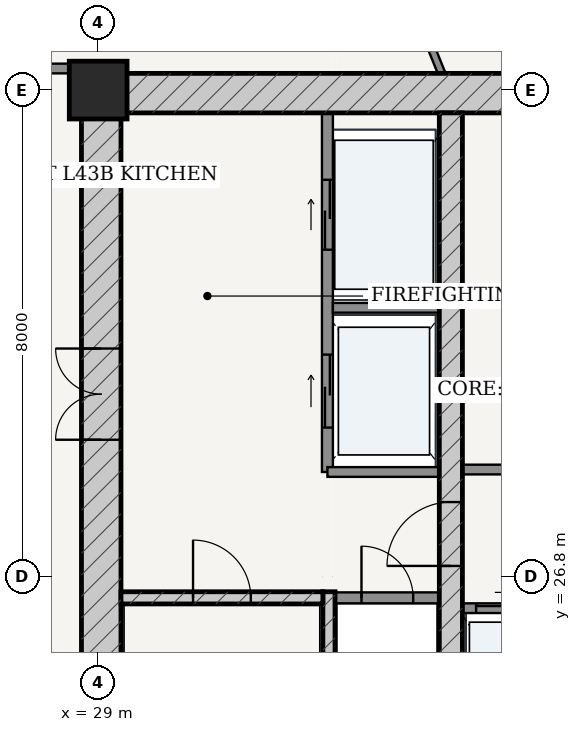
"""IFC4 building model, lengths in metres.
Left out: names, types, materials, properties, quantities, classifications, styles, units other than length and angle.
Written with IfcOpenShell. Run it as: python <this file> out.ifc"""

import sys

from ifc_helpers import new_model, si_unit, direction, frame, frame_2d, origin, origin_2d, place, context, subcontext, project, spatial, rectangle, extrude, source, transform, mapped, element, fill, save


model = new_model("IFC4")
c1 = context("Model", 3, precision=1e-05, world=origin(), true_north=direction((-0.2419218956, 0.970295726276)))
c2 = subcontext(c1, "Body", "Model", "MODEL_VIEW")
j1 = project(units=[si_unit("LENGTHUNIT", "METRE"), si_unit("PLANEANGLEUNIT", "RADIAN")], contexts=[c1])
p1 = place(None, origin())
s1 = spatial("IfcSite", under=j1, at=p1, CompositionType="ELEMENT")
p2 = place(p1, origin())
s2 = spatial("IfcBuilding", under=s1, at=p2, CompositionType="ELEMENT")
p3 = place(p2, frame((0.0, 0.0, 164.2)))
s3 = spatial("IfcBuildingStorey", under=s2, at=p3, CompositionType="ELEMENT", Elevation=164.2)
p4 = place(p3, frame((29.0, 34.8, 0.0), z_axis=(0.0, 0.0, 1.0), x_axis=(1.0, 0.0, 0.0)))
e1 = element("IfcColumn", 1, at=p4, inside=s3, PredefinedType="COLUMN", context=c2, shape_type="SweptSolid", body=[
    extrude(rectangle(XDim=0.95, YDim=0.95, at=origin_2d()), origin(), (0.0, 0.0, 1.0), 3.6),
])
p5 = place(p3, frame((28.725, 34.75, 0.0), z_axis=(0.0, 0.0, 1.0), x_axis=(1.0, 0.0, 0.0)))
e2 = element("IfcWall", 2, at=p5, inside=s3, PredefinedType="SHEAR", context=c2, shape_type="SweptSolid", body=[
    extrude(rectangle(XDim=18.55, YDim=0.65, at=frame_2d((9.275, 0.0))), origin(), (0.0, 0.0, 1.0), 3.33),
])
p6 = place(p3, frame((29.05, 19.175, 0.0), z_axis=(0.0, 0.0, 1.0), x_axis=(0.0, 1.0, 0.0)))
e3 = element("IfcWall", 3, at=p6, inside=s3, PredefinedType="SHEAR", context=c2, shape_type="SweptSolid", body=[
    extrude(rectangle(XDim=15.25, YDim=0.65, at=frame_2d((7.625, 0.0))), origin(), (0.0, 0.0, 1.0), 3.33),
])
p7 = place(p6, frame((9.875, 0.0, 0.0)))
e4 = element("IfcOpeningElement", 4, at=p7, cuts=e3, PredefinedType="OPENING", context=c2, shape_type="SweptSolid", body=[
    extrude(rectangle(XDim=1.5, YDim=2.2, at=frame_2d((0.75, 1.1))), frame((0.0, 0.335, 0.0), z_axis=(0.0, -1.0, 0.0), x_axis=(1.0, 0.0, 0.0)), (0.0, 0.0, 1.0), 0.67),
])
p8 = place(p3, frame((32.795, 19.175, 0.0), z_axis=(0.0, 0.0, 1.0), x_axis=(0.0, 1.0, 0.0)))
e5 = element("IfcWall", 5, at=p8, inside=s3, PredefinedType="SOLIDWALL", context=c2, shape_type="SweptSolid", body=[
    extrude(rectangle(XDim=7.375, YDim=0.2, at=frame_2d((3.688, 0.0))), origin(), (0.0, 0.0, 1.0), 3.33),
])
p9 = place(p3, frame((29.375, 26.45, 0.0), z_axis=(0.0, 0.0, 1.0), x_axis=(1.0, 0.0, 0.0)))
e6 = element("IfcWall", 6, at=p9, inside=s3, PredefinedType="SOLIDWALL", context=c2, shape_type="SweptSolid", body=[
    extrude(rectangle(XDim=3.32, YDim=0.2, at=frame_2d((1.66, 0.0))), origin(), (0.0, 0.0, 1.0), 3.33),
])
p10 = place(p9, frame((1.185, 0.0, 0.0)))
e7 = element("IfcOpeningElement", 7, at=p10, cuts=e6, PredefinedType="OPENING", context=c2, shape_type="SweptSolid", body=[
    extrude(rectangle(XDim=0.95, YDim=2.15, at=frame_2d((0.475, 1.075))), frame((0.0, 0.11, 0.0), z_axis=(0.0, -1.0, 0.0), x_axis=(1.0, 0.0, 0.0)), (0.0, 0.0, 1.0), 0.22),
])
p11 = place(p3, frame((34.8, 19.175, 0.0), z_axis=(0.0, 0.0, 1.0), x_axis=(0.0, 1.0, 0.0)))
e8 = element("IfcWall", 8, at=p11, inside=s3, PredefinedType="SHEAR", context=c2, shape_type="SweptSolid", body=[
    extrude(rectangle(XDim=15.25, YDim=0.38, at=frame_2d((7.625, 0.0))), origin(), (0.0, 0.0, 1.0), 3.33),
])
p12 = place(p11, frame((7.8, 0.0, 0.0)))
e9 = element("IfcOpeningElement", 9, at=p12, cuts=e8, PredefinedType="OPENING", context=c2, shape_type="SweptSolid", body=[
    extrude(rectangle(XDim=1.05, YDim=2.15, at=frame_2d((0.525, 1.075))), frame((0.0, 0.2, 0.0), z_axis=(0.0, -1.0, 0.0), x_axis=(1.0, 0.0, 0.0)), (0.0, 0.0, 1.0), 0.4),
])
p13 = place(p3, frame((32.9, 26.45, 0.0), z_axis=(0.0, 0.0, 1.0), x_axis=(1.0, 0.0, 0.0)))
e10 = element("IfcWall", 10, at=p13, inside=s3, PredefinedType="PARTITIONING", context=c2, shape_type="SweptSolid", body=[
    extrude(rectangle(XDim=1.71, YDim=0.18, at=frame_2d((0.855, 0.0))), origin(), (0.0, 0.0, 1.0), 3.33),
])
p14 = place(p13, frame((0.43, 0.0, 0.0)))
e11 = element("IfcOpeningElement", 11, at=p14, cuts=e10, PredefinedType="OPENING", context=c2, shape_type="SweptSolid", body=[
    extrude(rectangle(XDim=0.85, YDim=2.1, at=frame_2d((0.425, 1.05))), frame((0.0, 0.1, 0.0), z_axis=(0.0, -1.0, 0.0), x_axis=(1.0, 0.0, 0.0)), (0.0, 0.0, 1.0), 0.2),
])
p15 = place(p3, frame((32.77, 28.52, 0.0), z_axis=(0.0, 0.0, 1.0), x_axis=(0.0, 1.0, 0.0)))
e12 = element("IfcWall", 12, at=p15, inside=s3, PredefinedType="PARTITIONING", context=c2, shape_type="SweptSolid", body=[
    extrude(rectangle(XDim=5.905, YDim=0.18, at=frame_2d((2.953, 0.0))), origin(), (0.0, 0.0, 1.0), 3.33),
])
p16 = place(p15, frame((3.655, 0.0, 0.0)))
e13 = element("IfcOpeningElement", 13, at=p16, cuts=e12, PredefinedType="OPENING", context=c2, shape_type="SweptSolid", body=[
    extrude(rectangle(XDim=1.15, YDim=2.2, at=frame_2d((0.575, 1.1))), frame((0.0, 0.1, 0.0), z_axis=(0.0, -1.0, 0.0), x_axis=(1.0, 0.0, 0.0)), (0.0, 0.0, 1.0), 0.2),
])
p17 = place(p15, frame((0.73, 0.0, 0.0)))
e14 = element("IfcOpeningElement", 14, at=p17, cuts=e12, PredefinedType="OPENING", context=c2, shape_type="SweptSolid", body=[
    extrude(rectangle(XDim=1.2, YDim=2.25, at=frame_2d((0.6, 1.125))), frame((0.0, 0.1, 0.0), z_axis=(0.0, -1.0, 0.0), x_axis=(1.0, 0.0, 0.0)), (0.0, 0.0, 1.0), 0.2),
])
p18 = place(p3, frame((32.86, 31.22, 0.0), z_axis=(0.0, 0.0, 1.0), x_axis=(1.0, 0.0, 0.0)))
e15 = element("IfcWall", 15, at=p18, inside=s3, PredefinedType="PARTITIONING", context=c2, shape_type="SweptSolid", body=[
    extrude(rectangle(XDim=1.75, YDim=0.16, at=frame_2d((0.875, 0.0))), origin(), (0.0, 0.0, 1.0), 3.33),
])
p19 = place(p3, frame((32.77, 28.52, 0.0), z_axis=(0.0, 0.0, 1.0), x_axis=(1.0, 0.0, 0.0)))
e16 = element("IfcWall", 16, at=p19, inside=s3, PredefinedType="PARTITIONING", context=c2, shape_type="SweptSolid", body=[
    extrude(rectangle(XDim=1.84, YDim=0.16, at=frame_2d((0.92, 0.0))), origin(), (0.0, 0.0, 1.0), 3.33),
])
p20 = place(p3, frame((34.99, 28.56, 0.0), z_axis=(0.0, 0.0, 1.0), x_axis=(1.0, 0.0, 0.0)))
e17 = element("IfcWall", 17, at=p20, inside=s3, PredefinedType="PARTITIONING", context=c2, shape_type="SweptSolid", body=[
    extrude(rectangle(XDim=6.02, YDim=0.16, at=frame_2d((3.01, 0.0))), origin(), (0.0, 0.0, 1.0), 3.33),
])
p21 = place(p20, frame((2.585, 0.0, 0.0)))
e18 = element("IfcOpeningElement", 18, at=p21, cuts=e17, PredefinedType="OPENING", context=c2, shape_type="SweptSolid", body=[
    extrude(rectangle(XDim=0.85, YDim=2.1, at=frame_2d((0.425, 1.05))), frame((0.0, 0.09, 0.0), z_axis=(0.0, -1.0, 0.0), x_axis=(1.0, 0.0, 0.0)), (0.0, 0.0, 1.0), 0.18),
])
p22 = place(p3, frame((34.99, 26.28, 0.0), z_axis=(0.0, 0.0, 1.0), x_axis=(1.0, 0.0, 0.0)))
e19 = element("IfcWall", 19, at=p22, inside=s3, PredefinedType="PARTITIONING", context=c2, shape_type="SweptSolid", body=[
    extrude(rectangle(XDim=6.02, YDim=0.16, at=frame_2d((3.01, 0.0))), origin(), (0.0, 0.0, 1.0), 3.33),
])
p23 = place(p22, frame((0.225, 0.0, 0.0)))
e20 = element("IfcOpeningElement", 20, at=p23, cuts=e19, PredefinedType="OPENING", context=c2, shape_type="SweptSolid", body=[
    extrude(rectangle(XDim=1.1, YDim=2.2, at=frame_2d((0.55, 1.1))), frame((0.0, 0.09, 0.0), z_axis=(0.0, -1.0, 0.0), x_axis=(1.0, 0.0, 0.0)), (0.0, 0.0, 1.0), 0.18),
])
p24 = place(p22, frame((1.705, 0.0, 0.0)))
e21 = element("IfcOpeningElement", 21, at=p24, cuts=e19, PredefinedType="OPENING", context=c2, shape_type="SweptSolid", body=[
    extrude(rectangle(XDim=1.1, YDim=2.2, at=frame_2d((0.55, 1.1))), frame((0.0, 0.09, 0.0), z_axis=(0.0, -1.0, 0.0), x_axis=(1.0, 0.0, 0.0)), (0.0, 0.0, 1.0), 0.18),
])
p25 = place(p3, frame((26.795, 35.155, 0.0), z_axis=(0.0, 0.0, 1.0), x_axis=(1.0, 0.0, 0.0)))
e22 = element("IfcWall", 22, at=p25, inside=s3, PredefinedType="PARTITIONING", context=c2, shape_type="SweptSolid", body=[
    extrude(rectangle(XDim=1.93, YDim=0.16, at=frame_2d((0.965, 0.0))), origin(), (0.0, 0.0, 1.0), 2.776),
])
p26 = place(p3, frame((34.649, 35.075, 0.0), z_axis=(0.0, 0.0, 1.0), x_axis=(-0.37535719187, 0.926880239573, 0.0)))
e23 = element("IfcWall", 23, at=p26, inside=s3, PredefinedType="PARTITIONING", context=c2, shape_type="SweptSolid", body=[
    extrude(rectangle(XDim=2.916, YDim=0.12, at=frame_2d((1.458, 0.0))), origin(), (0.0, 0.0, 1.0), 3.33),
])
p27 = place(p26, frame((1.028, 0.0, 0.0)))
e24 = element("IfcOpeningElement", 24, at=p27, cuts=e23, PredefinedType="OPENING", context=c2, shape_type="SweptSolid", body=[
    extrude(rectangle(XDim=0.86, YDim=2.15, at=frame_2d((0.43, 1.075))), frame((0.0, 0.07, 0.0), z_axis=(0.0, -1.0, 0.0), x_axis=(1.0, 0.0, 0.0)), (0.0, 0.0, 1.0), 0.14),
])
m1 = source(origin(), c2, "Body", "SweptSolid", [
    extrude(rectangle(XDim=1.5, YDim=2.2, at=frame_2d((0.75, 1.1))), frame((0.0, 0.025, 0.0), z_axis=(0.0, -1.0, 0.0), x_axis=(1.0, 0.0, 0.0)), (0.0, 0.0, 1.0), 0.05),
])
p28 = place(p7, origin())
e25 = element("IfcDoor", 25, at=p28, inside=s3, OperationType="DOUBLE_DOOR_SINGLE_SWING", PredefinedType="DOOR", context=c2, shape_type="MappedRepresentation", body=[
    mapped(m1, transform((0.0, 0.0, 0.0), scale=1.0)),
])
fill(e4, e25)
m2 = source(origin(), c2, "Body", "SweptSolid", [
    extrude(rectangle(XDim=1.05, YDim=2.15, at=frame_2d((0.525, 1.075))), frame((0.0, 0.025, 0.0), z_axis=(0.0, -1.0, 0.0), x_axis=(1.0, 0.0, 0.0)), (0.0, 0.0, 1.0), 0.05),
])
p29 = place(p12, origin())
e26 = element("IfcDoor", 26, at=p29, inside=s3, OperationType="SINGLE_SWING_LEFT", PredefinedType="DOOR", context=c2, shape_type="MappedRepresentation", body=[
    mapped(m2, transform((0.0, 0.0, 0.0), scale=1.0)),
])
fill(e9, e26)
m3 = source(origin(), c2, "Body", "SweptSolid", [
    extrude(rectangle(XDim=0.95, YDim=2.15, at=frame_2d((0.475, 1.075))), frame((0.0, 0.025, 0.0), z_axis=(0.0, -1.0, 0.0), x_axis=(1.0, 0.0, 0.0)), (0.0, 0.0, 1.0), 0.05),
])
p30 = place(p10, origin())
e27 = element("IfcDoor", 27, at=p30, inside=s3, OperationType="SINGLE_SWING_LEFT", PredefinedType="DOOR", context=c2, shape_type="MappedRepresentation", body=[
    mapped(m3, transform((0.0, 0.0, 0.0), scale=1.0)),
])
fill(e7, e27)
m4 = source(origin(), c2, "Body", "SweptSolid", [
    extrude(rectangle(XDim=0.85, YDim=2.1, at=frame_2d((0.425, 1.05))), frame((0.0, 0.025, 0.0), z_axis=(0.0, -1.0, 0.0), x_axis=(1.0, 0.0, 0.0)), (0.0, 0.0, 1.0), 0.05),
])
p31 = place(p14, origin())
e28 = element("IfcDoor", 28, at=p31, inside=s3, OperationType="SINGLE_SWING_LEFT", PredefinedType="DOOR", context=c2, shape_type="MappedRepresentation", body=[
    mapped(m4, transform((0.0, 0.0, 0.0), scale=1.0)),
])
fill(e11, e28)
m5 = source(origin(), c2, "Body", "SweptSolid", [
    extrude(rectangle(XDim=1.15, YDim=2.2, at=frame_2d((0.575, 1.1))), frame((0.0, 0.025, 0.0), z_axis=(0.0, -1.0, 0.0), x_axis=(1.0, 0.0, 0.0)), (0.0, 0.0, 1.0), 0.05),
])
p32 = place(p16, origin())
e29 = element("IfcDoor", 29, at=p32, inside=s3, OperationType="DOUBLE_DOOR_SLIDING", PredefinedType="DOOR", context=c2, shape_type="MappedRepresentation", body=[
    mapped(m5, transform((0.0, 0.0, 0.0), scale=1.0)),
])
fill(e13, e29)
m6 = source(origin(), c2, "Body", "SweptSolid", [
    extrude(rectangle(XDim=1.2, YDim=2.25, at=frame_2d((0.6, 1.125))), frame((0.0, 0.025, 0.0), z_axis=(0.0, -1.0, 0.0), x_axis=(1.0, 0.0, 0.0)), (0.0, 0.0, 1.0), 0.05),
])
p33 = place(p17, origin())
e30 = element("IfcDoor", 30, at=p33, inside=s3, OperationType="DOUBLE_DOOR_SLIDING", PredefinedType="DOOR", context=c2, shape_type="MappedRepresentation", body=[
    mapped(m6, transform((0.0, 0.0, 0.0), scale=1.0)),
])
fill(e14, e30)
m7 = source(origin(), c2, "Body", "SweptSolid", [
    extrude(rectangle(XDim=1.1, YDim=2.2, at=frame_2d((0.55, 1.1))), frame((0.0, 0.025, 0.0), z_axis=(0.0, -1.0, 0.0), x_axis=(1.0, 0.0, 0.0)), (0.0, 0.0, 1.0), 0.05),
])
p34 = place(p23, origin())
e31 = element("IfcDoor", 31, at=p34, inside=s3, OperationType="DOUBLE_DOOR_SLIDING", PredefinedType="DOOR", context=c2, shape_type="MappedRepresentation", body=[
    mapped(m7, transform((0.0, 0.0, 0.0), scale=1.0)),
])
fill(e20, e31)
save(model, sys.argv[1])
